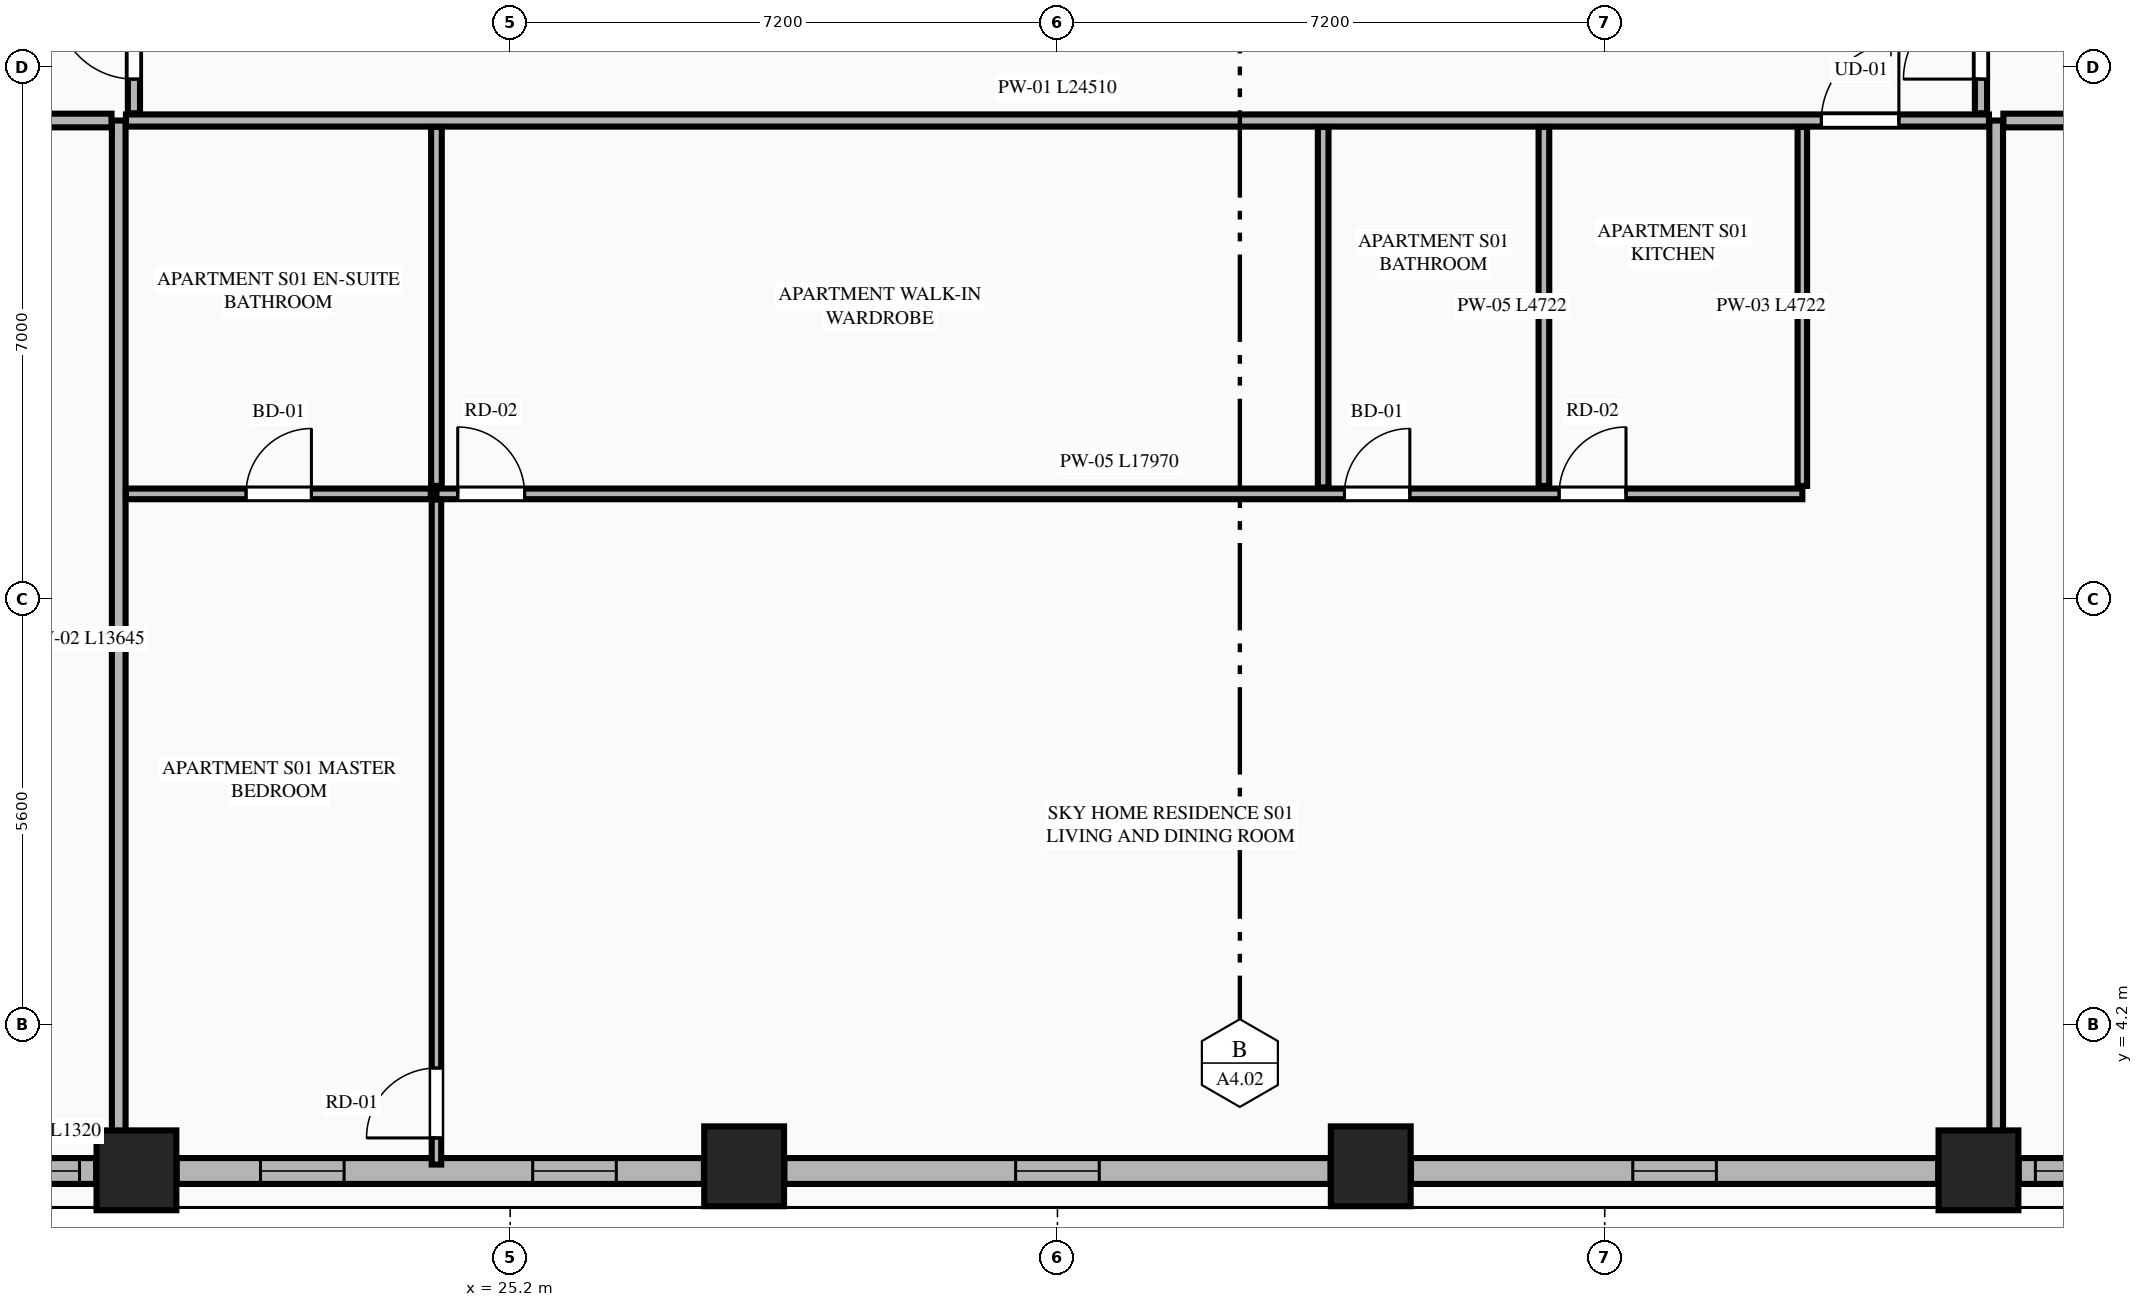
"""IFC4 building model, lengths in metres.
Left out: names, types, materials, properties, quantities, classifications, styles, units other than length and angle.
Written with IfcOpenShell. Run it as: python <this file> out.ifc"""

import sys

from ifc_helpers import new_model, si_unit, direction, frame, frame_2d, origin, origin_2d, place, context, subcontext, project, spatial, rectangle, extrude, element, fill, save


model = new_model("IFC4")
c1 = context("Model", 3, precision=1e-05, world=origin(), true_north=direction((0.0, 1.0)))
c2 = subcontext(c1, "Body", "Model", "MODEL_VIEW")
j1 = project(units=[si_unit("LENGTHUNIT", "METRE"), si_unit("PLANEANGLEUNIT", "RADIAN")], contexts=[c1])
p1 = place(None, origin())
s1 = spatial("IfcSite", under=j1, at=p1, CompositionType="ELEMENT")
p2 = place(p1, origin())
s2 = spatial("IfcBuilding", under=s1, at=p2, CompositionType="ELEMENT")
p3 = place(p2, frame((0.0, 0.0, 80.0)))
s3 = spatial("IfcBuildingStorey", under=s2, at=p3, CompositionType="ELEMENT", Elevation=80.0)
for number, where, z_axis, x_axis in (
    (1, (20.283, 2.289, 0.0), (0.0, 0.0, 1.0), (1.0, 0.0, 0.0)),
    (2, (28.278, 2.342, 0.0), (0.0, 0.0, 1.0), (1.0, 0.0, 0.0)),
    (3, (36.522, 2.342, 0.0), (0.0, 0.0, 1.0), (1.0, 0.0, 0.0)),
    (4, (44.517, 2.289, 0.0), (0.0, 0.0, 1.0), (1.0, 0.0, 0.0)),
):
    element("IfcColumn", number, at=place(p3, frame(where, z_axis=z_axis, x_axis=x_axis)), inside=s3, PredefinedType="COLUMN", context=c2, shape_type="SweptSolid", body=[
        extrude(rectangle(XDim=1.05, YDim=1.05, at=origin_2d()), origin(), (0.0, 0.0, 1.0), 3.55),
    ])
p4 = place(p3, frame((18.434, 2.28, 0.0), z_axis=(0.0, 0.0, 1.0), x_axis=(1.0, 0.0, 0.0)))
e5 = element("IfcWall", 5, at=p4, inside=s3, PredefinedType="STANDARD", context=c2, shape_type="SweptSolid", body=[
    extrude(rectangle(XDim=1.32, YDim=0.34, at=frame_2d((0.66, 0.0))), origin(), (0.0, 0.0, 1.0), 3.33),
])
p5 = place(p4, frame((0.22, 0.0, 0.75)))
e6 = element("IfcOpeningElement", 6, at=p5, cuts=e5, PredefinedType="OPENING", context=c2, shape_type="SweptSolid", body=[
    extrude(rectangle(XDim=0.88, YDim=2.0, at=frame_2d((0.44, 1.0))), frame((0.0, 0.18, 0.0), z_axis=(0.0, -1.0, 0.0), x_axis=(1.0, 0.0, 0.0)), (0.0, 0.0, 1.0), 0.36),
])
p6 = place(p3, frame((20.812, 2.28, 0.0), z_axis=(0.0, 0.0, 1.0), x_axis=(1.0, 0.0, 0.0)))
e7 = element("IfcWall", 7, at=p6, inside=s3, PredefinedType="STANDARD", context=c2, shape_type="SweptSolid", body=[
    extrude(rectangle(XDim=6.937, YDim=0.34, at=frame_2d((3.469, 0.0))), origin(), (0.0, 0.0, 1.0), 2.787),
])
p7 = place(p6, frame((1.103, 0.0, 0.75)))
e8 = element("IfcOpeningElement", 8, at=p7, cuts=e7, PredefinedType="OPENING", context=c2, shape_type="SweptSolid", body=[
    extrude(rectangle(XDim=1.1, YDim=1.887, at=frame_2d((0.55, 0.943))), frame((0.0, 0.18, 0.0), z_axis=(0.0, -1.0, 0.0), x_axis=(1.0, 0.0, 0.0)), (0.0, 0.0, 1.0), 0.36),
])
p8 = place(p6, frame((4.684, 0.0, 0.75)))
e9 = element("IfcOpeningElement", 9, at=p8, cuts=e7, PredefinedType="OPENING", context=c2, shape_type="SweptSolid", body=[
    extrude(rectangle(XDim=1.1, YDim=1.887, at=frame_2d((0.55, 0.943))), frame((0.0, 0.18, 0.0), z_axis=(0.0, -1.0, 0.0), x_axis=(1.0, 0.0, 0.0)), (0.0, 0.0, 1.0), 0.36),
])
p9 = place(p3, frame((28.807, 2.28, 0.0), z_axis=(0.0, 0.0, 1.0), x_axis=(1.0, 0.0, 0.0)))
e10 = element("IfcWall", 10, at=p9, inside=s3, PredefinedType="STANDARD", context=c2, shape_type="SweptSolid", body=[
    extrude(rectangle(XDim=7.186, YDim=0.34, at=frame_2d((3.593, 0.0))), origin(), (0.0, 0.0, 1.0), 2.787),
])
p10 = place(p9, frame((3.043, 0.0, 0.75)))
e11 = element("IfcOpeningElement", 11, at=p10, cuts=e10, PredefinedType="OPENING", context=c2, shape_type="SweptSolid", body=[
    extrude(rectangle(XDim=1.1, YDim=1.887, at=frame_2d((0.55, 0.943))), frame((0.0, 0.18, 0.0), z_axis=(0.0, -1.0, 0.0), x_axis=(1.0, 0.0, 0.0)), (0.0, 0.0, 1.0), 0.36),
])
p11 = place(p3, frame((37.051, 2.28, 0.0), z_axis=(0.0, 0.0, 1.0), x_axis=(1.0, 0.0, 0.0)))
e12 = element("IfcWall", 12, at=p11, inside=s3, PredefinedType="STANDARD", context=c2, shape_type="SweptSolid", body=[
    extrude(rectangle(XDim=6.937, YDim=0.34, at=frame_2d((3.469, 0.0))), origin(), (0.0, 0.0, 1.0), 2.787),
])
p12 = place(p11, frame((2.918, 0.0, 0.75)))
e13 = element("IfcOpeningElement", 13, at=p12, cuts=e12, PredefinedType="OPENING", context=c2, shape_type="SweptSolid", body=[
    extrude(rectangle(XDim=1.1, YDim=1.887, at=frame_2d((0.55, 0.943))), frame((0.0, 0.18, 0.0), z_axis=(0.0, -1.0, 0.0), x_axis=(1.0, 0.0, 0.0)), (0.0, 0.0, 1.0), 0.36),
])
p13 = place(p3, frame((45.046, 2.28, 0.0), z_axis=(0.0, 0.0, 1.0), x_axis=(1.0, 0.0, 0.0)))
e14 = element("IfcWall", 14, at=p13, inside=s3, PredefinedType="STANDARD", context=c2, shape_type="SweptSolid", body=[
    extrude(rectangle(XDim=1.32, YDim=0.34, at=frame_2d((0.66, 0.0))), origin(), (0.0, 0.0, 1.0), 3.33),
])
p14 = place(p13, frame((0.22, 0.0, 0.75)))
e15 = element("IfcOpeningElement", 15, at=p14, cuts=e14, PredefinedType="OPENING", context=c2, shape_type="SweptSolid", body=[
    extrude(rectangle(XDim=0.88, YDim=2.0, at=frame_2d((0.44, 1.0))), frame((0.0, 0.18, 0.0), z_axis=(0.0, -1.0, 0.0), x_axis=(1.0, 0.0, 0.0)), (0.0, 0.0, 1.0), 0.36),
])
for number, where, z_axis, x_axis in (
    (16, (20.05, 2.455, 0.0), (0.0, 0.0, 1.0), (0.0, 1.0, 0.0)),
    (17, (44.75, 2.455, 0.0), (0.0, 0.0, 1.0), (0.0, 1.0, 0.0)),
):
    element("IfcWall", number, at=place(p3, frame(where, z_axis=z_axis, x_axis=x_axis)), inside=s3, PredefinedType="PARTITIONING", context=c2, shape_type="SweptSolid", body=[
        extrude(rectangle(XDim=13.645, YDim=0.18, at=frame_2d((6.823, 0.0))), origin(), (0.0, 0.0, 1.0), 3.33),
    ])
p15 = place(p3, frame((20.145, 16.1, 0.0), z_axis=(0.0, 0.0, 1.0), x_axis=(1.0, 0.0, 0.0)))
e18 = element("IfcWall", 18, at=p15, inside=s3, PredefinedType="PARTITIONING", context=c2, shape_type="SweptSolid", body=[
    extrude(rectangle(XDim=24.51, YDim=0.16, at=frame_2d((12.255, 0.0))), origin(), (0.0, 0.0, 1.0), 3.33),
])
p16 = place(p15, frame((22.305, 0.0, 0.0)))
e19 = element("IfcOpeningElement", 19, at=p16, cuts=e18, PredefinedType="OPENING", context=c2, shape_type="SweptSolid", body=[
    extrude(rectangle(XDim=1.02, YDim=2.25, at=frame_2d((0.51, 1.125))), frame((0.0, 0.09, 0.0), z_axis=(0.0, -1.0, 0.0), x_axis=(1.0, 0.0, 0.0)), (0.0, 0.0, 1.0), 0.18),
])
p17 = place(p3, frame((42.2, 11.293, 0.0), z_axis=(0.0, 0.0, 1.0), x_axis=(0.0, 1.0, 0.0)))
e20 = element("IfcWall", 20, at=p17, inside=s3, PredefinedType="PARTITIONING", context=c2, shape_type="SweptSolid", body=[
    extrude(rectangle(XDim=4.722, YDim=0.125, at=frame_2d((2.361, 0.0))), origin(), (0.0, 0.0, 1.0), 2.7),
])
p18 = place(p3, frame((24.23, 11.188, 0.0), z_axis=(0.0, 0.0, 1.0), x_axis=(1.0, 0.0, 0.0)))
e21 = element("IfcWall", 21, at=p18, inside=s3, PredefinedType="PLUMBINGWALL", context=c2, shape_type="SweptSolid", body=[
    extrude(rectangle(XDim=17.97, YDim=0.14, at=frame_2d((8.985, 0.0))), origin(), (0.0, 0.0, 1.0), 3.33),
])
p19 = place(p18, frame((0.28, 0.0, 0.0)))
e22 = element("IfcOpeningElement", 22, at=p19, cuts=e21, PredefinedType="OPENING", context=c2, shape_type="SweptSolid", body=[
    extrude(rectangle(XDim=0.88, YDim=2.15, at=frame_2d((0.44, 1.075))), frame((0.0, 0.08, 0.0), z_axis=(0.0, -1.0, 0.0), x_axis=(1.0, 0.0, 0.0)), (0.0, 0.0, 1.0), 0.16),
])
p20 = place(p18, frame((11.946, 0.0, 0.0)))
e23 = element("IfcOpeningElement", 23, at=p20, cuts=e21, PredefinedType="OPENING", context=c2, shape_type="SweptSolid", body=[
    extrude(rectangle(XDim=0.86, YDim=2.1, at=frame_2d((0.43, 1.05))), frame((0.0, 0.08, 0.0), z_axis=(0.0, -1.0, 0.0), x_axis=(1.0, 0.0, 0.0)), (0.0, 0.0, 1.0), 0.16),
])
p21 = place(p18, frame((14.77, 0.0, 0.0)))
e24 = element("IfcOpeningElement", 24, at=p21, cuts=e21, PredefinedType="OPENING", context=c2, shape_type="SweptSolid", body=[
    extrude(rectangle(XDim=0.88, YDim=2.15, at=frame_2d((0.44, 1.075))), frame((0.0, 0.08, 0.0), z_axis=(0.0, -1.0, 0.0), x_axis=(1.0, 0.0, 0.0)), (0.0, 0.0, 1.0), 0.16),
])
p22 = place(p3, frame((20.145, 11.188, 0.0), z_axis=(0.0, 0.0, 1.0), x_axis=(1.0, 0.0, 0.0)))
e25 = element("IfcWall", 25, at=p22, inside=s3, PredefinedType="PLUMBINGWALL", context=c2, shape_type="SweptSolid", body=[
    extrude(rectangle(XDim=4.01, YDim=0.14, at=frame_2d((2.005, 0.0))), origin(), (0.0, 0.0, 1.0), 3.33),
])
p23 = place(p22, frame((1.58, 0.0, 0.0)))
e26 = element("IfcOpeningElement", 26, at=p23, cuts=e25, PredefinedType="OPENING", context=c2, shape_type="SweptSolid", body=[
    extrude(rectangle(XDim=0.86, YDim=2.1, at=frame_2d((0.43, 1.05))), frame((0.0, 0.08, 0.0), z_axis=(0.0, -1.0, 0.0), x_axis=(1.0, 0.0, 0.0)), (0.0, 0.0, 1.0), 0.16),
])
for number, where, z_axis, x_axis in (
    (27, (38.8, 11.293, 0.0), (0.0, 0.0, 1.0), (0.0, 1.0, 0.0)),
    (28, (24.23, 11.293, 0.0), (0.0, 0.0, 1.0), (0.0, 1.0, 0.0)),
):
    element("IfcWall", number, at=place(p3, frame(where, z_axis=z_axis, x_axis=x_axis)), inside=s3, PredefinedType="PLUMBINGWALL", context=c2, shape_type="SweptSolid", body=[
        extrude(rectangle(XDim=4.722, YDim=0.14, at=frame_2d((2.361, 0.0))), origin(), (0.0, 0.0, 1.0), 3.33),
    ])
p24 = place(p3, frame((24.23, 2.365, 0.0), z_axis=(0.0, 0.0, 1.0), x_axis=(0.0, 1.0, 0.0)))
e29 = element("IfcWall", 29, at=p24, inside=s3, PredefinedType="PARTITIONING", context=c2, shape_type="SweptSolid", body=[
    extrude(rectangle(XDim=8.748, YDim=0.125, at=frame_2d((4.374, 0.0))), origin(), (0.0, 0.0, 1.0), 3.33),
])
p25 = place(p24, frame((0.35, 0.0, 0.0)))
e30 = element("IfcOpeningElement", 30, at=p25, cuts=e29, PredefinedType="OPENING", context=c2, shape_type="SweptSolid", body=[
    extrude(rectangle(XDim=0.92, YDim=2.15, at=frame_2d((0.46, 1.075))), frame((0.0, 0.073, 0.0), z_axis=(0.0, -1.0, 0.0), x_axis=(1.0, 0.0, 0.0)), (0.0, 0.0, 1.0), 0.145),
])
p26 = place(p3, frame((35.896, 11.273, 0.0), z_axis=(0.0, 0.0, 1.0), x_axis=(0.0, 1.0, 0.0)))
e31 = element("IfcWall", 31, at=p26, inside=s3, PredefinedType="PLUMBINGWALL", context=c2, shape_type="SweptSolid", body=[
    extrude(rectangle(XDim=4.742, YDim=0.14, at=frame_2d((2.371, 0.0))), origin(), (0.0, 0.0, 1.0), 3.33),
])
for number, where, z_axis, x_axis in (
    (32, (10.488, 16.1, 0.0), (0.0, 0.0, 1.0), (1.0, 0.0, 0.0)),
    (33, (44.845, 16.1, 0.0), (0.0, 0.0, 1.0), (1.0, 0.0, 0.0)),
):
    element("IfcWall", number, at=place(p3, frame(where, z_axis=z_axis, x_axis=x_axis)), inside=s3, PredefinedType="PARTITIONING", context=c2, shape_type="SweptSolid", body=[
        extrude(rectangle(XDim=9.467, YDim=0.18, at=frame_2d((4.733, 0.0))), origin(), (0.0, 0.0, 1.0), 3.33),
    ])
p27 = place(p3, frame((20.25, 16.195, 0.0), z_axis=(0.0, 0.0, 1.0), x_axis=(0.0, 1.0, 0.0)))
e34 = element("IfcWall", 34, at=p27, inside=s3, PredefinedType="PARTITIONING", context=c2, shape_type="SweptSolid", body=[
    extrude(rectangle(XDim=19.41, YDim=0.16, at=frame_2d((9.705, 0.0))), origin(), (0.0, 0.0, 1.0), 2.7),
])
p28 = place(p27, frame((0.45, 0.0, 0.0)))
e35 = element("IfcOpeningElement", 35, at=p28, cuts=e34, PredefinedType="OPENING", context=c2, shape_type="SweptSolid", body=[
    extrude(rectangle(XDim=1.02, YDim=2.25, at=frame_2d((0.51, 1.125))), frame((0.0, 0.09, 0.0), z_axis=(0.0, -1.0, 0.0), x_axis=(1.0, 0.0, 0.0)), (0.0, 0.0, 1.0), 0.18),
])
p29 = place(p3, frame((44.55, 16.195, 0.0), z_axis=(0.0, 0.0, 1.0), x_axis=(0.0, 1.0, 0.0)))
e36 = element("IfcWall", 36, at=p29, inside=s3, PredefinedType="PARTITIONING", context=c2, shape_type="SweptSolid", body=[
    extrude(rectangle(XDim=19.41, YDim=0.16, at=frame_2d((9.705, 0.0))), origin(), (0.0, 0.0, 1.0), 2.7),
])
p30 = place(p29, frame((0.45, 0.0, 0.0)))
e37 = element("IfcOpeningElement", 37, at=p30, cuts=e36, PredefinedType="OPENING", context=c2, shape_type="SweptSolid", body=[
    extrude(rectangle(XDim=1.02, YDim=2.25, at=frame_2d((0.51, 1.125))), frame((0.0, 0.09, 0.0), z_axis=(0.0, -1.0, 0.0), x_axis=(1.0, 0.0, 0.0)), (0.0, 0.0, 1.0), 0.18),
])
p31 = place(p7, origin())
e38 = element("IfcWindow", 38, at=p31, inside=s3, PartitioningType="SINGLE_PANEL", PredefinedType="WINDOW", context=c2, shape_type="SweptSolid", body=[
    extrude(rectangle(XDim=1.1, YDim=1.887, at=frame_2d((0.55, 0.943))), frame((0.0, 0.03, 0.0), z_axis=(0.0, -1.0, 0.0), x_axis=(1.0, 0.0, 0.0)), (0.0, 0.0, 1.0), 0.06),
])
fill(e8, e38)
p32 = place(p10, origin())
e39 = element("IfcWindow", 39, at=p32, inside=s3, PartitioningType="SINGLE_PANEL", PredefinedType="WINDOW", context=c2, shape_type="SweptSolid", body=[
    extrude(rectangle(XDim=1.1, YDim=1.887, at=frame_2d((0.55, 0.943))), frame((0.0, 0.03, 0.0), z_axis=(0.0, -1.0, 0.0), x_axis=(1.0, 0.0, 0.0)), (0.0, 0.0, 1.0), 0.06),
])
fill(e11, e39)
p33 = place(p12, origin())
e40 = element("IfcWindow", 40, at=p33, inside=s3, PartitioningType="SINGLE_PANEL", PredefinedType="WINDOW", context=c2, shape_type="SweptSolid", body=[
    extrude(rectangle(XDim=1.1, YDim=1.887, at=frame_2d((0.55, 0.943))), frame((0.0, 0.03, 0.0), z_axis=(0.0, -1.0, 0.0), x_axis=(1.0, 0.0, 0.0)), (0.0, 0.0, 1.0), 0.06),
])
fill(e13, e40)
p34 = place(p19, origin())
e41 = element("IfcDoor", 41, at=p34, inside=s3, OperationType="SINGLE_SWING_LEFT", PredefinedType="DOOR", context=c2, shape_type="SweptSolid", body=[
    extrude(rectangle(XDim=0.88, YDim=2.15, at=frame_2d((0.44, 1.075))), frame((0.0, 0.025, 0.0), z_axis=(0.0, -1.0, 0.0), x_axis=(1.0, 0.0, 0.0)), (0.0, 0.0, 1.0), 0.05),
])
fill(e22, e41)
p35 = place(p20, origin())
e42 = element("IfcDoor", 42, at=p35, inside=s3, OperationType="SINGLE_SWING_RIGHT", PredefinedType="DOOR", context=c2, shape_type="SweptSolid", body=[
    extrude(rectangle(XDim=0.86, YDim=2.1, at=frame_2d((0.43, 1.05))), frame((0.0, 0.025, 0.0), z_axis=(0.0, -1.0, 0.0), x_axis=(1.0, 0.0, 0.0)), (0.0, 0.0, 1.0), 0.05),
])
fill(e23, e42)
p36 = place(p23, origin())
e43 = element("IfcDoor", 43, at=p36, inside=s3, OperationType="SINGLE_SWING_RIGHT", PredefinedType="DOOR", context=c2, shape_type="SweptSolid", body=[
    extrude(rectangle(XDim=0.86, YDim=2.1, at=frame_2d((0.43, 1.05))), frame((0.0, 0.025, 0.0), z_axis=(0.0, -1.0, 0.0), x_axis=(1.0, 0.0, 0.0)), (0.0, 0.0, 1.0), 0.05),
])
fill(e26, e43)
p37 = place(p16, origin())
e44 = element("IfcDoor", 44, at=p37, inside=s3, OperationType="SINGLE_SWING_RIGHT", PredefinedType="DOOR", context=c2, shape_type="SweptSolid", body=[
    extrude(rectangle(XDim=1.02, YDim=2.25, at=frame_2d((0.51, 1.125))), frame((0.0, 0.025, 0.0), z_axis=(0.0, -1.0, 0.0), x_axis=(1.0, 0.0, 0.0)), (0.0, 0.0, 1.0), 0.05),
])
fill(e19, e44)
p38 = place(p21, origin())
e45 = element("IfcDoor", 45, at=p38, inside=s3, OperationType="SINGLE_SWING_RIGHT", PredefinedType="DOOR", context=c2, shape_type="SweptSolid", body=[
    extrude(rectangle(XDim=0.88, YDim=2.15, at=frame_2d((0.44, 1.075))), frame((0.0, 0.025, 0.0), z_axis=(0.0, -1.0, 0.0), x_axis=(1.0, 0.0, 0.0)), (0.0, 0.0, 1.0), 0.05),
])
fill(e24, e45)
p39 = place(p25, origin())
e46 = element("IfcDoor", 46, at=p39, inside=s3, OperationType="SINGLE_SWING_LEFT", PredefinedType="DOOR", context=c2, shape_type="SweptSolid", body=[
    extrude(rectangle(XDim=0.92, YDim=2.15, at=frame_2d((0.46, 1.075))), frame((0.0, 0.025, 0.0), z_axis=(0.0, -1.0, 0.0), x_axis=(1.0, 0.0, 0.0)), (0.0, 0.0, 1.0), 0.05),
])
fill(e30, e46)
p40 = place(p28, origin())
e47 = element("IfcDoor", 47, at=p40, inside=s3, OperationType="SINGLE_SWING_RIGHT", PredefinedType="DOOR", context=c2, shape_type="SweptSolid", body=[
    extrude(rectangle(XDim=1.02, YDim=2.25, at=frame_2d((0.51, 1.125))), frame((0.0, 0.025, 0.0), z_axis=(0.0, -1.0, 0.0), x_axis=(1.0, 0.0, 0.0)), (0.0, 0.0, 1.0), 0.05),
])
fill(e35, e47)
p41 = place(p30, origin())
e48 = element("IfcDoor", 48, at=p41, inside=s3, OperationType="SINGLE_SWING_LEFT", PredefinedType="DOOR", context=c2, shape_type="SweptSolid", body=[
    extrude(rectangle(XDim=1.02, YDim=2.25, at=frame_2d((0.51, 1.125))), frame((0.0, 0.025, 0.0), z_axis=(0.0, -1.0, 0.0), x_axis=(1.0, 0.0, 0.0)), (0.0, 0.0, 1.0), 0.05),
])
fill(e37, e48)
p42 = place(p5, origin())
e49 = element("IfcWindow", 49, at=p42, inside=s3, PartitioningType="SINGLE_PANEL", PredefinedType="WINDOW", context=c2, shape_type="SweptSolid", body=[
    extrude(rectangle(XDim=0.88, YDim=2.0, at=frame_2d((0.44, 1.0))), frame((0.0, 0.03, 0.0), z_axis=(0.0, -1.0, 0.0), x_axis=(1.0, 0.0, 0.0)), (0.0, 0.0, 1.0), 0.06),
])
fill(e6, e49)
p43 = place(p8, origin())
e50 = element("IfcWindow", 50, at=p43, inside=s3, PartitioningType="SINGLE_PANEL", PredefinedType="WINDOW", context=c2, shape_type="SweptSolid", body=[
    extrude(rectangle(XDim=1.1, YDim=1.887, at=frame_2d((0.55, 0.943))), frame((0.0, 0.03, 0.0), z_axis=(0.0, -1.0, 0.0), x_axis=(1.0, 0.0, 0.0)), (0.0, 0.0, 1.0), 0.06),
])
fill(e9, e50)
p44 = place(p14, origin())
e51 = element("IfcWindow", 51, at=p44, inside=s3, PartitioningType="SINGLE_PANEL", PredefinedType="WINDOW", context=c2, shape_type="SweptSolid", body=[
    extrude(rectangle(XDim=0.88, YDim=2.0, at=frame_2d((0.44, 1.0))), frame((0.0, 0.03, 0.0), z_axis=(0.0, -1.0, 0.0), x_axis=(1.0, 0.0, 0.0)), (0.0, 0.0, 1.0), 0.06),
])
fill(e15, e51)
save(model, sys.argv[1])
